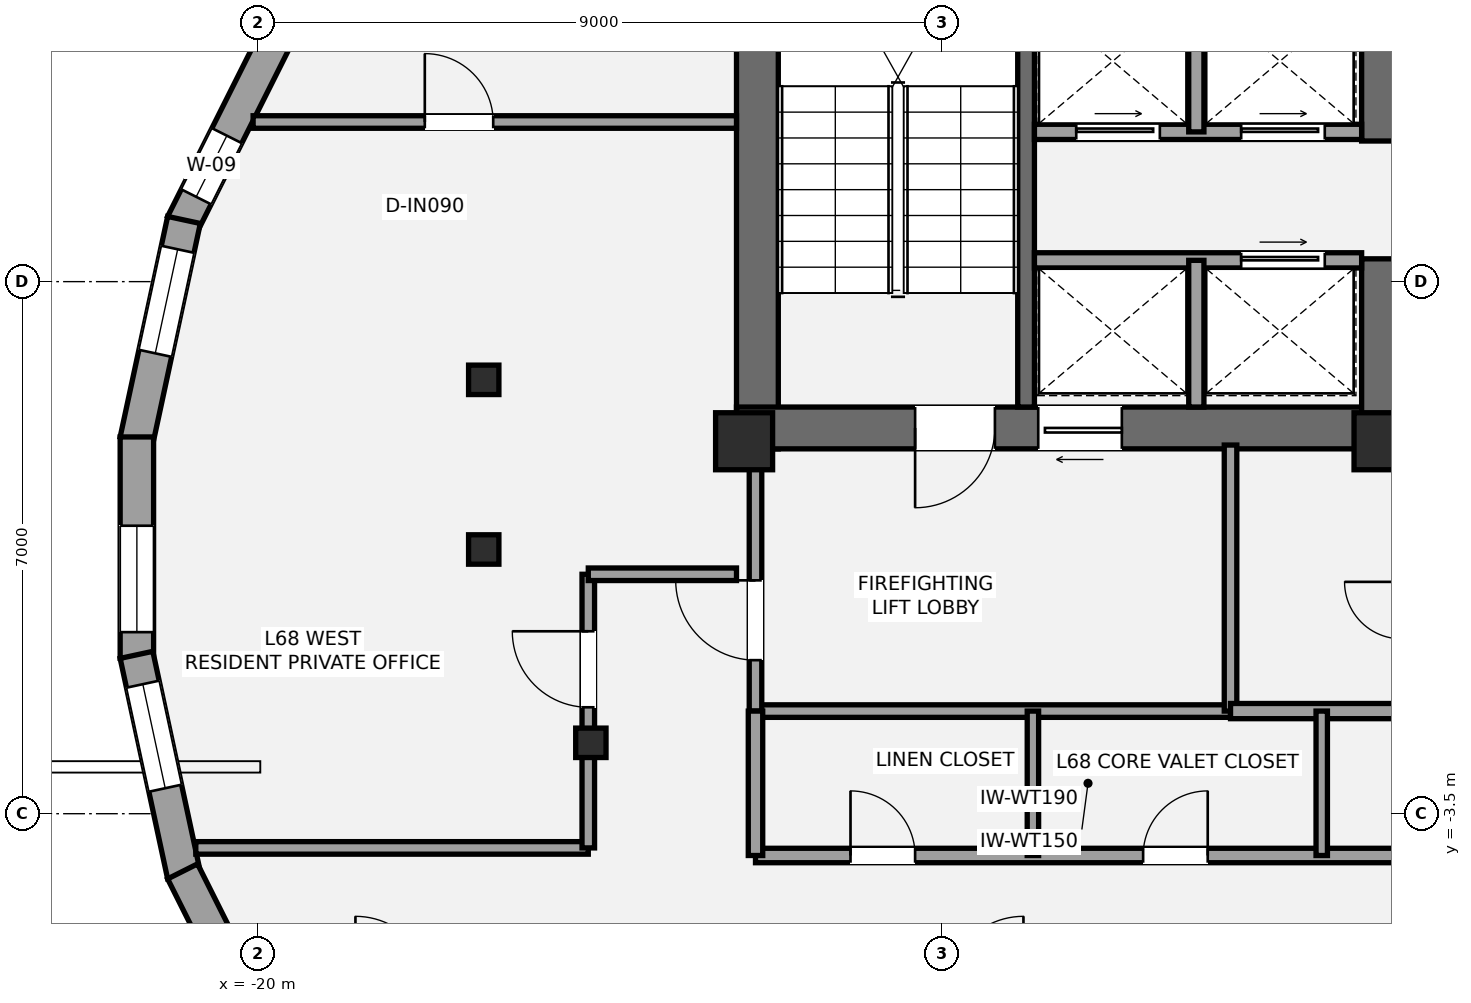
"""IFC4 building model, lengths in metres.
Left out: names, types, materials, properties, quantities, classifications, styles, units other than length and angle.
Written with IfcOpenShell. Run it as: python <this file> out.ifc"""

import sys

from ifc_helpers import new_model, si_unit, direction, frame, frame_2d, origin, origin_2d, place, context, subcontext, project, spatial, rectangle, i_section, extrude, element, fill, save


model = new_model("IFC4")
c1 = context("Model", 3, precision=1e-05, world=origin(), true_north=direction((0.0, 1.0)))
c2 = subcontext(c1, "Body", "Model", "MODEL_VIEW")
j1 = project(units=[si_unit("LENGTHUNIT", "METRE"), si_unit("PLANEANGLEUNIT", "RADIAN")], contexts=[c1])
p1 = place(None, origin())
s1 = spatial("IfcSite", under=j1, at=p1, CompositionType="ELEMENT")
p2 = place(p1, origin())
s2 = spatial("IfcBuilding", under=s1, at=p2, CompositionType="ELEMENT")
p3 = place(p2, frame((0.0, 0.0, 241.5)))
s3 = spatial("IfcBuildingStorey", under=s2, at=p3, CompositionType="ELEMENT", Elevation=241.5)
p4 = place(p3, frame((-13.425, 1.3, 0.0), z_axis=(0.0, 0.0, 1.0), x_axis=(0.0, 1.0, 0.0)))
e1 = element("IfcWall", 1, at=p4, inside=s3, PredefinedType="SHEAR", context=c2, shape_type="SweptSolid", body=[
    extrude(rectangle(XDim=8.25, YDim=0.55, at=frame_2d((4.125, 0.0))), origin(), (0.0, 0.0, 1.0), 3.15),
])
p5 = place(p3, frame((-4.925, 1.575, 0.0), z_axis=(0.0, 0.0, 1.0), x_axis=(-1.0, 0.0, 0.0)))
e2 = element("IfcWall", 2, at=p5, inside=s3, PredefinedType="SHEAR", context=c2, shape_type="SweptSolid", body=[
    extrude(rectangle(XDim=8.775, YDim=0.55, at=frame_2d((4.387, 0.0))), origin(), (0.0, 0.0, 1.0), 3.15),
])
p6 = place(p5, frame((5.375, 0.0, 0.0)))
e3 = element("IfcOpeningElement", 3, at=p6, cuts=e2, PredefinedType="OPENING", context=c2, shape_type="SweptSolid", body=[
    extrude(rectangle(XDim=1.05, YDim=2.15, at=frame_2d((0.525, 1.075))), frame((0.0, 0.285, 0.0), z_axis=(0.0, -1.0, 0.0), x_axis=(1.0, 0.0, 0.0)), (0.0, 0.0, 1.0), 0.57),
])
p7 = place(p5, frame((3.705, 0.0, 0.0)))
e4 = element("IfcOpeningElement", 4, at=p7, cuts=e2, PredefinedType="OPENING", context=c2, shape_type="SweptSolid", body=[
    extrude(rectangle(XDim=1.1, YDim=2.2, at=frame_2d((0.55, 1.1))), frame((0.0, 0.285, 0.0), z_axis=(0.0, -1.0, 0.0), x_axis=(1.0, 0.0, 0.0)), (0.0, 0.0, 1.0), 0.57),
])
p8 = place(p3, frame((-5.2, 1.3, 0.0), z_axis=(0.0, 0.0, 1.0), x_axis=(0.0, 1.0, 0.0)))
e5 = element("IfcWall", 5, at=p8, inside=s3, PredefinedType="SHEAR", context=c2, shape_type="SweptSolid", body=[
    extrude(rectangle(XDim=2.5, YDim=0.55, at=frame_2d((1.25, 0.0))), origin(), (0.0, 0.0, 1.0), 3.15),
])
p9 = place(p3, frame((-5.2, 5.35, 0.0), z_axis=(0.0, 0.0, 1.0), x_axis=(0.0, 1.0, 0.0)))
e6 = element("IfcWall", 6, at=p9, inside=s3, PredefinedType="SHEAR", context=c2, shape_type="SweptSolid", body=[
    extrude(rectangle(XDim=2.0, YDim=0.55, at=frame_2d((1.0, 0.0))), origin(), (0.0, 0.0, 1.0), 3.15),
])
p10 = place(p3, frame((-9.89, 1.85, 0.0), z_axis=(0.0, 0.0, 1.0), x_axis=(0.0, 1.0, 0.0)))
e7 = element("IfcWall", 7, at=p10, inside=s3, PredefinedType="SHEAR", context=c2, shape_type="SweptSolid", body=[
    extrude(rectangle(XDim=7.15, YDim=0.22, at=frame_2d((3.575, 0.0))), origin(), (0.0, 0.0, 1.0), 3.15),
])
for number, where, z_axis, x_axis in (
    (8, (-13.6, 1.4, 0.0), (0.0, 0.0, 1.0), (1.0, 0.0, 0.0)),
    (9, (-5.2, 1.4, 0.0), (0.0, 0.0, 1.0), (1.0, 0.0, 0.0)),
):
    element("IfcColumn", number, at=place(p3, frame(where, z_axis=z_axis, x_axis=x_axis)), inside=s3, PredefinedType="PILASTER", context=c2, shape_type="SweptSolid", body=[
        extrude(rectangle(XDim=0.75, YDim=0.75, at=origin_2d()), origin(), (0.0, 0.0, 1.0), 3.15),
    ])
for number, where, z_axis, x_axis in (
    (10, (-17.026, 2.208, 0.0), (0.0, 0.0, 1.0), (1.0, 0.0, 0.0)),
    (11, (-17.026, -0.024, 0.0), (0.0, 0.0, 1.0), (1.0, 0.0, 0.0)),
    (12, (-15.616, -2.567, 0.0), (0.0, 0.0, 1.0), (1.0, 0.0, 0.0)),
):
    element("IfcColumn", number, at=place(p3, frame(where, z_axis=z_axis, x_axis=x_axis)), inside=s3, PredefinedType="COLUMN", context=c2, shape_type="SweptSolid", body=[
        extrude(i_section(OverallWidth=0.399, OverallDepth=0.387, WebThickness=0.021, FlangeThickness=0.033, at=origin_2d()), origin(), (0.0, 0.0, 1.0), 3.15),
    ])
p11 = place(p3, frame((-20.988, 4.259, 0.0), z_axis=(0.0, 0.0, 1.0), x_axis=(0.448424724145, 0.893820601002, 0.0)))
e13 = element("IfcWall", 13, at=p11, inside=s3, PredefinedType="STANDARD", context=c2, shape_type="SweptSolid", body=[
    extrude(rectangle(XDim=3.144, YDim=0.44, at=frame_2d((1.572, 0.0))), origin(), (0.0, 0.0, 1.0), 2.336),
])
p12 = place(p11, frame((0.399, 0.0, 0.58)))
e14 = element("IfcOpeningElement", 14, at=p12, cuts=e13, PredefinedType="OPENING", context=c2, shape_type="SweptSolid", body=[
    extrude(rectangle(XDim=0.9, YDim=1.35, at=frame_2d((0.45, 0.675))), frame((0.0, 0.23, 0.0), z_axis=(0.0, -1.0, 0.0), x_axis=(1.0, 0.0, 0.0)), (0.0, 0.0, 1.0), 0.46),
])
p13 = place(p3, frame((-21.594, 1.41, 0.0), z_axis=(0.0, 0.0, 1.0), x_axis=(0.210540350534, 0.977585168053, 0.0)))
e15 = element("IfcWall", 15, at=p13, inside=s3, PredefinedType="STANDARD", context=c2, shape_type="SweptSolid", body=[
    extrude(rectangle(XDim=2.967, YDim=0.44, at=frame_2d((1.484, 0.0))), origin(), (0.0, 0.0, 1.0), 2.336),
])
p14 = place(p13, frame((1.173, 0.0, 0.58)))
e16 = element("IfcOpeningElement", 16, at=p14, cuts=e15, PredefinedType="OPENING", context=c2, shape_type="SweptSolid", body=[
    extrude(rectangle(XDim=1.4, YDim=1.55, at=frame_2d((0.7, 0.775))), frame((0.0, 0.23, 0.0), z_axis=(0.0, -1.0, 0.0), x_axis=(1.0, 0.0, 0.0)), (0.0, 0.0, 1.0), 0.46),
])
p15 = place(p3, frame((-21.589, -1.457, 0.0), z_axis=(0.0, 0.0, 1.0), x_axis=(0.0, 1.0, 0.0)))
e17 = element("IfcWall", 17, at=p15, inside=s3, PredefinedType="STANDARD", context=c2, shape_type="SweptSolid", body=[
    extrude(rectangle(XDim=2.913, YDim=0.44, at=frame_2d((1.457, 0.0))), origin(), (0.0, 0.0, 1.0), 2.336),
])
p16 = place(p15, frame((0.345, 0.0, 0.55)))
e18 = element("IfcOpeningElement", 18, at=p16, cuts=e17, PredefinedType="OPENING", context=c2, shape_type="SweptSolid", body=[
    extrude(rectangle(XDim=1.4, YDim=1.55, at=frame_2d((0.7, 0.775))), frame((0.0, 0.23, 0.0), z_axis=(0.0, -1.0, 0.0), x_axis=(1.0, 0.0, 0.0)), (0.0, 0.0, 1.0), 0.46),
])
p17 = place(p3, frame((-20.969, -4.311, 0.0), z_axis=(0.0, 0.0, 1.0), x_axis=(-0.210540350534, 0.977585168053, 0.0)))
e19 = element("IfcWall", 19, at=p17, inside=s3, PredefinedType="STANDARD", context=c2, shape_type="SweptSolid", body=[
    extrude(rectangle(XDim=2.967, YDim=0.44, at=frame_2d((1.484, 0.0))), origin(), (0.0, 0.0, 1.0), 2.336),
])
p18 = place(p17, frame((1.173, 0.0, 0.58)))
e20 = element("IfcOpeningElement", 20, at=p18, cuts=e19, PredefinedType="OPENING", context=c2, shape_type="SweptSolid", body=[
    extrude(rectangle(XDim=1.4, YDim=1.55, at=frame_2d((0.7, 0.775))), frame((0.0, 0.23, 0.0), z_axis=(0.0, -1.0, 0.0), x_axis=(1.0, 0.0, 0.0)), (0.0, 0.0, 1.0), 0.46),
])
p19 = place(p3, frame((-19.578, -7.069, 0.0), z_axis=(0.0, 0.0, 1.0), x_axis=(-0.448424724145, 0.893820601002, 0.0)))
e21 = element("IfcWall", 21, at=p19, inside=s3, PredefinedType="STANDARD", context=c2, shape_type="SweptSolid", body=[
    extrude(rectangle(XDim=3.144, YDim=0.44, at=frame_2d((1.572, 0.0))), origin(), (0.0, 0.0, 1.0), 2.336),
])
p20 = place(p19, frame((0.25, 0.0, 0.58)))
e22 = element("IfcOpeningElement", 22, at=p20, cuts=e21, PredefinedType="OPENING", context=c2, shape_type="SweptSolid", body=[
    extrude(rectangle(XDim=0.9, YDim=1.35, at=frame_2d((0.45, 0.675))), frame((0.0, 0.23, 0.0), z_axis=(0.0, -1.0, 0.0), x_axis=(1.0, 0.0, 0.0)), (0.0, 0.0, 1.0), 0.46),
])
p21 = place(p3, frame((-13.45, -2.15, 0.0), z_axis=(0.0, 0.0, 1.0), x_axis=(1.0, 0.0, 0.0)))
e23 = element("IfcWall", 23, at=p21, inside=s3, PredefinedType="PARTITIONING", context=c2, shape_type="SweptSolid", body=[
    extrude(rectangle(XDim=6.25, YDim=0.165, at=frame_2d((3.125, 0.0))), origin(), (0.0, 0.0, 1.0), 2.423),
])
p22 = place(p3, frame((-13.45, -2.15, 0.0), z_axis=(0.0, 0.0, 1.0), x_axis=(0.0, 1.0, 0.0)))
e24 = element("IfcWall", 24, at=p22, inside=s3, PredefinedType="PARTITIONING", context=c2, shape_type="SweptSolid", body=[
    extrude(rectangle(XDim=3.5, YDim=0.165, at=frame_2d((1.75, 0.0))), origin(), (0.0, 0.0, 1.0), 2.423),
])
p23 = place(p22, frame((0.67, 0.0, 0.0)))
e25 = element("IfcOpeningElement", 25, at=p23, cuts=e24, PredefinedType="OPENING", context=c2, shape_type="SweptSolid", body=[
    extrude(rectangle(XDim=1.05, YDim=2.15, at=frame_2d((0.525, 1.075))), frame((0.0, 0.093, 0.0), z_axis=(0.0, -1.0, 0.0), x_axis=(1.0, 0.0, 0.0)), (0.0, 0.0, 1.0), 0.185),
])
p24 = place(p3, frame((-7.2, -2.15, 0.0), z_axis=(0.0, 0.0, 1.0), x_axis=(0.0, 1.0, 0.0)))
e26 = element("IfcWall", 26, at=p24, inside=s3, PredefinedType="PARTITIONING", context=c2, shape_type="SweptSolid", body=[
    extrude(rectangle(XDim=3.5, YDim=0.165, at=frame_2d((1.75, 0.0))), origin(), (0.0, 0.0, 1.0), 2.423),
])
p25 = place(p3, frame((-7.2, -2.15, 0.0), z_axis=(0.0, 0.0, 1.0), x_axis=(1.0, 0.0, 0.0)))
e27 = element("IfcWall", 27, at=p25, inside=s3, PredefinedType="SOLIDWALL", context=c2, shape_type="SweptSolid", body=[
    extrude(rectangle(XDim=2.25, YDim=0.2, at=frame_2d((1.125, 0.0))), origin(), (0.0, 0.0, 1.0), 2.97),
])
p26 = place(p3, frame((-9.78, 3.78, 0.0), z_axis=(0.0, 0.0, 1.0), x_axis=(1.0, 0.0, 0.0)))
e28 = element("IfcWall", 28, at=p26, inside=s3, PredefinedType="SOLIDWALL", context=c2, shape_type="SweptSolid", body=[
    extrude(rectangle(XDim=4.305, YDim=0.2, at=frame_2d((2.152, 0.0))), origin(), (0.0, 0.0, 1.0), 2.97),
])
p27 = place(p26, frame((2.72, 0.0, 0.0)))
e29 = element("IfcOpeningElement", 29, at=p27, cuts=e28, PredefinedType="OPENING", context=c2, shape_type="SweptSolid", body=[
    extrude(rectangle(XDim=1.1, YDim=2.2, at=frame_2d((0.55, 1.1))), frame((0.0, 0.11, 0.0), z_axis=(0.0, -1.0, 0.0), x_axis=(1.0, 0.0, 0.0)), (0.0, 0.0, 1.0), 0.22),
])
p28 = place(p3, frame((-7.65, 1.85, 0.0), z_axis=(0.0, 0.0, 1.0), x_axis=(0.0, 1.0, 0.0)))
e30 = element("IfcWall", 30, at=p28, inside=s3, PredefinedType="SOLIDWALL", context=c2, shape_type="SweptSolid", body=[
    extrude(rectangle(XDim=1.93, YDim=0.2, at=frame_2d((0.965, 0.0))), origin(), (0.0, 0.0, 1.0), 2.97),
])
p29 = place(p3, frame((-9.78, 5.47, 0.0), z_axis=(0.0, 0.0, 1.0), x_axis=(1.0, 0.0, 0.0)))
e31 = element("IfcWall", 31, at=p29, inside=s3, PredefinedType="SOLIDWALL", context=c2, shape_type="SweptSolid", body=[
    extrude(rectangle(XDim=4.305, YDim=0.2, at=frame_2d((2.152, 0.0))), origin(), (0.0, 0.0, 1.0), 2.97),
])
p30 = place(p29, frame((0.55, 0.0, 0.0)))
e32 = element("IfcOpeningElement", 32, at=p30, cuts=e31, PredefinedType="OPENING", context=c2, shape_type="SweptSolid", body=[
    extrude(rectangle(XDim=1.1, YDim=2.2, at=frame_2d((0.55, 1.1))), frame((0.0, 0.11, 0.0), z_axis=(0.0, -1.0, 0.0), x_axis=(1.0, 0.0, 0.0)), (0.0, 0.0, 1.0), 0.22),
])
p31 = place(p29, frame((2.72, 0.0, 0.0)))
e33 = element("IfcOpeningElement", 33, at=p31, cuts=e31, PredefinedType="OPENING", context=c2, shape_type="SweptSolid", body=[
    extrude(rectangle(XDim=1.1, YDim=2.2, at=frame_2d((0.55, 1.1))), frame((0.0, 0.11, 0.0), z_axis=(0.0, -1.0, 0.0), x_axis=(1.0, 0.0, 0.0)), (0.0, 0.0, 1.0), 0.22),
])
p32 = place(p3, frame((-7.65, 5.47, 0.0), z_axis=(0.0, 0.0, 1.0), x_axis=(0.0, 1.0, 0.0)))
e34 = element("IfcWall", 34, at=p32, inside=s3, PredefinedType="SOLIDWALL", context=c2, shape_type="SweptSolid", body=[
    extrude(rectangle(XDim=1.86, YDim=0.2, at=frame_2d((0.93, 0.0))), origin(), (0.0, 0.0, 1.0), 2.97),
])
p33 = place(p3, frame((-13.45, -4.05, 0.0), z_axis=(0.0, 0.0, 1.0), x_axis=(1.0, 0.0, 0.0)))
e35 = element("IfcWall", 35, at=p33, inside=s3, PredefinedType="PLUMBINGWALL", context=c2, shape_type="SweptSolid", body=[
    extrude(rectangle(XDim=11.35, YDim=0.19, at=frame_2d((5.675, 0.0))), origin(), (0.0, 0.0, 1.0), 2.357),
])
p34 = place(p33, frame((1.25, 0.0, 0.0)))
e36 = element("IfcOpeningElement", 36, at=p34, cuts=e35, PredefinedType="OPENING", context=c2, shape_type="SweptSolid", body=[
    extrude(rectangle(XDim=0.85, YDim=2.1, at=frame_2d((0.425, 1.05))), frame((0.0, 0.105, 0.0), z_axis=(0.0, -1.0, 0.0), x_axis=(1.0, 0.0, 0.0)), (0.0, 0.0, 1.0), 0.21),
])
p35 = place(p33, frame((5.1, 0.0, 0.0)))
e37 = element("IfcOpeningElement", 37, at=p35, cuts=e35, PredefinedType="OPENING", context=c2, shape_type="SweptSolid", body=[
    extrude(rectangle(XDim=0.85, YDim=2.1, at=frame_2d((0.425, 1.05))), frame((0.0, 0.105, 0.0), z_axis=(0.0, -1.0, 0.0), x_axis=(1.0, 0.0, 0.0)), (0.0, 0.0, 1.0), 0.21),
])
p36 = place(p33, frame((8.95, 0.0, 0.0)))
e38 = element("IfcOpeningElement", 38, at=p36, cuts=e35, PredefinedType="OPENING", context=c2, shape_type="SweptSolid", body=[
    extrude(rectangle(XDim=0.95, YDim=2.15, at=frame_2d((0.475, 1.075))), frame((0.0, 0.105, 0.0), z_axis=(0.0, -1.0, 0.0), x_axis=(1.0, 0.0, 0.0)), (0.0, 0.0, 1.0), 0.21),
])
p37 = place(p3, frame((-13.45, -4.05, 0.0), z_axis=(0.0, 0.0, 1.0), x_axis=(0.0, 1.0, 0.0)))
e39 = element("IfcWall", 39, at=p37, inside=s3, PredefinedType="PLUMBINGWALL", context=c2, shape_type="SweptSolid", body=[
    extrude(rectangle(XDim=1.9, YDim=0.19, at=frame_2d((0.95, 0.0))), origin(), (0.0, 0.0, 1.0), 2.423),
])
p38 = place(p3, frame((-9.8, -4.05, 0.0), z_axis=(0.0, 0.0, 1.0), x_axis=(0.0, 1.0, 0.0)))
e40 = element("IfcWall", 40, at=p38, inside=s3, PredefinedType="PLUMBINGWALL", context=c2, shape_type="SweptSolid", body=[
    extrude(rectangle(XDim=1.9, YDim=0.15, at=frame_2d((0.95, 0.0))), origin(), (0.0, 0.0, 1.0), 2.97),
])
p39 = place(p3, frame((-6.0, -4.05, 0.0), z_axis=(0.0, 0.0, 1.0), x_axis=(0.0, 1.0, 0.0)))
e41 = element("IfcWall", 41, at=p39, inside=s3, PredefinedType="PLUMBINGWALL", context=c2, shape_type="SweptSolid", body=[
    extrude(rectangle(XDim=1.9, YDim=0.15, at=frame_2d((0.95, 0.0))), origin(), (0.0, 0.0, 1.0), 2.431),
])
p40 = place(p3, frame((-20.814, -3.95, 0.0), z_axis=(0.0, 0.0, 1.0), x_axis=(1.0, 0.0, 0.0)))
e42 = element("IfcWall", 42, at=p40, inside=s3, PredefinedType="PARTITIONING", context=c2, shape_type="SweptSolid", body=[
    extrude(rectangle(XDim=5.164, YDim=0.165, at=frame_2d((2.582, 0.0))), origin(), (0.0, 0.0, 1.0), 2.423),
])
p41 = place(p3, frame((-15.65, -3.95, 0.0), z_axis=(0.0, 0.0, 1.0), x_axis=(0.0, 1.0, 0.0)))
e43 = element("IfcWall", 43, at=p41, inside=s3, PredefinedType="PARTITIONING", context=c2, shape_type="SweptSolid", body=[
    extrude(rectangle(XDim=3.6, YDim=0.165, at=frame_2d((1.8, 0.0))), origin(), (0.0, 0.0, 1.0), 2.357),
])
p42 = place(p41, frame((1.85, 0.0, 0.0)))
e44 = element("IfcOpeningElement", 44, at=p42, cuts=e43, PredefinedType="OPENING", context=c2, shape_type="SweptSolid", body=[
    extrude(rectangle(XDim=1.0, YDim=2.15, at=frame_2d((0.5, 1.075))), frame((0.0, 0.093, 0.0), z_axis=(0.0, -1.0, 0.0), x_axis=(1.0, 0.0, 0.0)), (0.0, 0.0, 1.0), 0.185),
])
p43 = place(p3, frame((-15.65, -0.35, 0.0), z_axis=(0.0, 0.0, 1.0), x_axis=(1.0, 0.0, 0.0)))
e45 = element("IfcWall", 45, at=p43, inside=s3, PredefinedType="PARTITIONING", context=c2, shape_type="SweptSolid", body=[
    extrude(rectangle(XDim=1.95, YDim=0.165, at=frame_2d((0.975, 0.0))), origin(), (0.0, 0.0, 1.0), 2.97),
])
p44 = place(p3, frame((-20.06, 5.6, 0.0), z_axis=(0.0, 0.0, 1.0), x_axis=(1.0, 0.0, 0.0)))
e46 = element("IfcWall", 46, at=p44, inside=s3, PredefinedType="PARTITIONING", context=c2, shape_type="SweptSolid", body=[
    extrude(rectangle(XDim=6.36, YDim=0.165, at=frame_2d((3.18, 0.0))), origin(), (0.0, 0.0, 1.0), 2.423),
])
p45 = place(p44, frame((2.259, 0.0, 0.0)))
e47 = element("IfcOpeningElement", 47, at=p45, cuts=e46, PredefinedType="OPENING", context=c2, shape_type="SweptSolid", body=[
    extrude(rectangle(XDim=0.9, YDim=2.1, at=frame_2d((0.45, 1.05))), frame((0.0, 0.093, 0.0), z_axis=(0.0, -1.0, 0.0), x_axis=(1.0, 0.0, 0.0)), (0.0, 0.0, 1.0), 0.185),
])
p46 = place(p12, origin())
e48 = element("IfcWindow", 48, at=p46, inside=s3, PartitioningType="SINGLE_PANEL", PredefinedType="WINDOW", context=c2, shape_type="SweptSolid", body=[
    extrude(rectangle(XDim=0.9, YDim=1.35, at=frame_2d((0.45, 0.675))), frame((0.0, -0.01, 0.0), z_axis=(0.0, -1.0, 0.0), x_axis=(1.0, 0.0, 0.0)), (0.0, 0.0, 1.0), 0.06),
])
fill(e14, e48)
p47 = place(p14, origin())
e49 = element("IfcWindow", 49, at=p47, inside=s3, PartitioningType="SINGLE_PANEL", PredefinedType="WINDOW", context=c2, shape_type="SweptSolid", body=[
    extrude(rectangle(XDim=1.4, YDim=1.55, at=frame_2d((0.7, 0.775))), frame((0.0, -0.01, 0.0), z_axis=(0.0, -1.0, 0.0), x_axis=(1.0, 0.0, 0.0)), (0.0, 0.0, 1.0), 0.06),
])
fill(e16, e49)
p48 = place(p16, origin())
e50 = element("IfcWindow", 50, at=p48, inside=s3, PartitioningType="SINGLE_PANEL", PredefinedType="WINDOW", context=c2, shape_type="SweptSolid", body=[
    extrude(rectangle(XDim=1.4, YDim=1.55, at=frame_2d((0.7, 0.775))), frame((0.0, -0.01, 0.0), z_axis=(0.0, -1.0, 0.0), x_axis=(1.0, 0.0, 0.0)), (0.0, 0.0, 1.0), 0.06),
])
fill(e18, e50)
p49 = place(p18, origin())
e51 = element("IfcWindow", 51, at=p49, inside=s3, PartitioningType="SINGLE_PANEL", PredefinedType="WINDOW", context=c2, shape_type="SweptSolid", body=[
    extrude(rectangle(XDim=1.4, YDim=1.55, at=frame_2d((0.7, 0.775))), frame((0.0, -0.01, 0.0), z_axis=(0.0, -1.0, 0.0), x_axis=(1.0, 0.0, 0.0)), (0.0, 0.0, 1.0), 0.06),
])
fill(e20, e51)
p50 = place(p6, origin())
e52 = element("IfcDoor", 52, at=p50, inside=s3, OperationType="SINGLE_SWING_RIGHT", PredefinedType="DOOR", context=c2, shape_type="SweptSolid", body=[
    extrude(rectangle(XDim=1.05, YDim=2.15, at=frame_2d((0.525, 1.075))), frame((0.0, 0.025, 0.0), z_axis=(0.0, -1.0, 0.0), x_axis=(1.0, 0.0, 0.0)), (0.0, 0.0, 1.0), 0.05),
])
fill(e3, e52)
p51 = place(p23, origin())
e53 = element("IfcDoor", 53, at=p51, inside=s3, OperationType="SINGLE_SWING_RIGHT", PredefinedType="DOOR", context=c2, shape_type="SweptSolid", body=[
    extrude(rectangle(XDim=1.05, YDim=2.15, at=frame_2d((0.525, 1.075))), frame((0.0, 0.025, 0.0), z_axis=(0.0, -1.0, 0.0), x_axis=(1.0, 0.0, 0.0)), (0.0, 0.0, 1.0), 0.05),
])
fill(e25, e53)
p52 = place(p7, origin())
e54 = element("IfcDoor", 54, at=p52, inside=s3, OperationType="SLIDING_TO_LEFT", PredefinedType="DOOR", context=c2, shape_type="SweptSolid", body=[
    extrude(rectangle(XDim=1.1, YDim=2.2, at=frame_2d((0.55, 1.1))), frame((0.0, 0.025, 0.0), z_axis=(0.0, -1.0, 0.0), x_axis=(1.0, 0.0, 0.0)), (0.0, 0.0, 1.0), 0.05),
])
fill(e4, e54)
p53 = place(p30, origin())
e55 = element("IfcDoor", 55, at=p53, inside=s3, OperationType="SLIDING_TO_LEFT", PredefinedType="DOOR", context=c2, shape_type="SweptSolid", body=[
    extrude(rectangle(XDim=1.1, YDim=2.2, at=frame_2d((0.55, 1.1))), frame((0.0, 0.025, 0.0), z_axis=(0.0, -1.0, 0.0), x_axis=(1.0, 0.0, 0.0)), (0.0, 0.0, 1.0), 0.05),
])
fill(e32, e55)
p54 = place(p31, origin())
e56 = element("IfcDoor", 56, at=p54, inside=s3, OperationType="SLIDING_TO_LEFT", PredefinedType="DOOR", context=c2, shape_type="SweptSolid", body=[
    extrude(rectangle(XDim=1.1, YDim=2.2, at=frame_2d((0.55, 1.1))), frame((0.0, 0.025, 0.0), z_axis=(0.0, -1.0, 0.0), x_axis=(1.0, 0.0, 0.0)), (0.0, 0.0, 1.0), 0.05),
])
fill(e33, e56)
p55 = place(p27, origin())
e57 = element("IfcDoor", 57, at=p55, inside=s3, OperationType="SLIDING_TO_LEFT", PredefinedType="DOOR", context=c2, shape_type="SweptSolid", body=[
    extrude(rectangle(XDim=1.1, YDim=2.2, at=frame_2d((0.55, 1.1))), frame((0.0, 0.025, 0.0), z_axis=(0.0, -1.0, 0.0), x_axis=(1.0, 0.0, 0.0)), (0.0, 0.0, 1.0), 0.05),
])
fill(e29, e57)
p56 = place(p34, origin())
e58 = element("IfcDoor", 58, at=p56, inside=s3, OperationType="SINGLE_SWING_LEFT", PredefinedType="DOOR", context=c2, shape_type="SweptSolid", body=[
    extrude(rectangle(XDim=0.85, YDim=2.1, at=frame_2d((0.425, 1.05))), frame((0.0, 0.025, 0.0), z_axis=(0.0, -1.0, 0.0), x_axis=(1.0, 0.0, 0.0)), (0.0, 0.0, 1.0), 0.05),
])
fill(e36, e58)
p57 = place(p35, origin())
e59 = element("IfcDoor", 59, at=p57, inside=s3, OperationType="SINGLE_SWING_RIGHT", PredefinedType="DOOR", context=c2, shape_type="SweptSolid", body=[
    extrude(rectangle(XDim=0.85, YDim=2.1, at=frame_2d((0.425, 1.05))), frame((0.0, 0.025, 0.0), z_axis=(0.0, -1.0, 0.0), x_axis=(1.0, 0.0, 0.0)), (0.0, 0.0, 1.0), 0.05),
])
fill(e37, e59)
p58 = place(p42, origin())
e60 = element("IfcDoor", 60, at=p58, inside=s3, OperationType="SINGLE_SWING_RIGHT", PredefinedType="DOOR", context=c2, shape_type="SweptSolid", body=[
    extrude(rectangle(XDim=1.0, YDim=2.15, at=frame_2d((0.5, 1.075))), frame((0.0, 0.025, 0.0), z_axis=(0.0, -1.0, 0.0), x_axis=(1.0, 0.0, 0.0)), (0.0, 0.0, 1.0), 0.05),
])
fill(e44, e60)
p59 = place(p45, origin())
e61 = element("IfcDoor", 61, at=p59, inside=s3, OperationType="SINGLE_SWING_LEFT", PredefinedType="DOOR", context=c2, shape_type="SweptSolid", body=[
    extrude(rectangle(XDim=0.9, YDim=2.1, at=frame_2d((0.45, 1.05))), frame((0.0, 0.025, 0.0), z_axis=(0.0, -1.0, 0.0), x_axis=(1.0, 0.0, 0.0)), (0.0, 0.0, 1.0), 0.05),
])
fill(e47, e61)
save(model, sys.argv[1])
